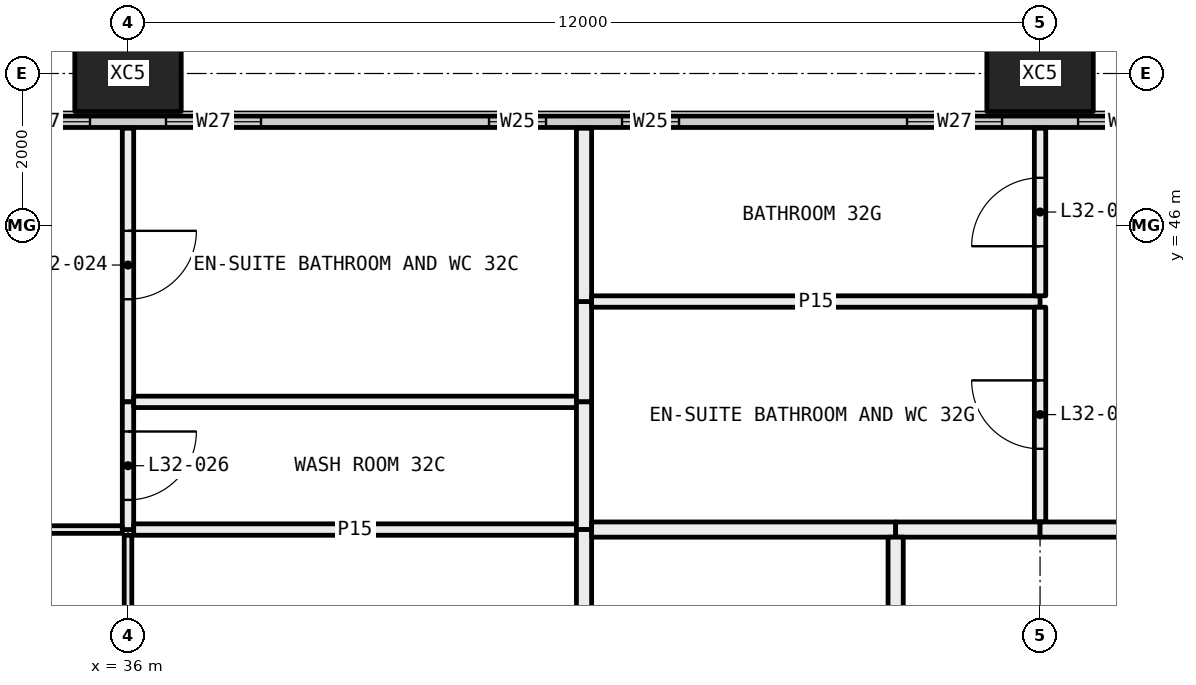
"""IFC4 building model, lengths in metres.
Left out: names, types, materials, properties, quantities, classifications, styles, units other than length and angle.
Written with IfcOpenShell. Run it as: python <this file> out.ifc"""

import sys

from ifc_helpers import new_model, si_unit, direction, frame, frame_2d, origin, origin_2d, place, context, subcontext, project, spatial, rectangle, hollow_rectangle, extrude, element, fill, save


model = new_model("IFC4")
c1 = context("Model", 3, precision=1e-05, world=origin(), true_north=direction((0.0, 1.0)))
c2 = subcontext(c1, "Body", "Model", "MODEL_VIEW")
j1 = project(units=[si_unit("LENGTHUNIT", "METRE"), si_unit("PLANEANGLEUNIT", "RADIAN")], contexts=[c1])
p1 = place(None, origin())
s1 = spatial("IfcSite", under=j1, at=p1, CompositionType="ELEMENT")
p2 = place(p1, origin())
s2 = spatial("IfcBuilding", under=s1, at=p2, CompositionType="ELEMENT")
p3 = place(p2, frame((0.0, 0.0, 124.2)))
s3 = spatial("IfcBuildingStorey", under=s2, at=p3, CompositionType="ELEMENT", Elevation=124.2)
for number, where, z_axis, x_axis in (
    (1, (36.0, 48.0, -0.4), (0.0, 0.0, 1.0), (1.0, 0.0, 0.0)),
    (2, (48.0, 48.0, -0.4), (0.0, 0.0, 1.0), (1.0, 0.0, 0.0)),
):
    element("IfcColumn", number, at=place(p3, frame(where, z_axis=z_axis, x_axis=x_axis)), inside=s3, PredefinedType="COLUMN", context=c2, shape_type="SweptSolid", body=[
        extrude(hollow_rectangle(XDim=1.4, YDim=1.0, WallThickness=0.055, at=origin_2d()), origin(), (0.0, 0.0, 1.0), 3.45),
    ])
p4 = place(p3, frame((6.56, 47.365, 0.0), z_axis=(0.0, 0.0, 1.0), x_axis=(1.0, 0.0, 0.0)))
e3 = element("IfcWall", 3, at=p4, inside=s3, PredefinedType="ELEMENTEDWALL", context=c2, shape_type="SweptSolid", body=[
    extrude(rectangle(XDim=58.88, YDim=0.15, at=frame_2d((29.44, 0.0))), origin(), (0.0, 0.0, 1.0), 3.05),
])
p5 = place(p4, frame((0.44, 0.0, 0.45)))
e4 = element("IfcOpeningElement", 4, at=p5, cuts=e3, PredefinedType="OPENING", context=c2, shape_type="SweptSolid", body=[
    extrude(rectangle(XDim=4.5, YDim=2.55, at=frame_2d((2.25, 1.275))), frame((0.0, 0.085, 0.0), z_axis=(0.0, -1.0, 0.0), x_axis=(1.0, 0.0, 0.0)), (0.0, 0.0, 1.0), 0.17),
])
p6 = place(p4, frame((5.94, 0.0, 0.45)))
e5 = element("IfcOpeningElement", 5, at=p6, cuts=e3, PredefinedType="OPENING", context=c2, shape_type="SweptSolid", body=[
    extrude(rectangle(XDim=1.25, YDim=2.55, at=frame_2d((0.625, 1.275))), frame((0.0, 0.085, 0.0), z_axis=(0.0, -1.0, 0.0), x_axis=(1.0, 0.0, 0.0)), (0.0, 0.0, 1.0), 0.17),
])
p7 = place(p4, frame((10.19, 0.0, 0.45)))
e6 = element("IfcOpeningElement", 6, at=p7, cuts=e3, PredefinedType="OPENING", context=c2, shape_type="SweptSolid", body=[
    extrude(rectangle(XDim=0.75, YDim=2.55, at=frame_2d((0.375, 1.275))), frame((0.0, 0.085, 0.0), z_axis=(0.0, -1.0, 0.0), x_axis=(1.0, 0.0, 0.0)), (0.0, 0.0, 1.0), 0.17),
])
p8 = place(p4, frame((11.94, 0.0, 0.45)))
e7 = element("IfcOpeningElement", 7, at=p8, cuts=e3, PredefinedType="OPENING", context=c2, shape_type="SweptSolid", body=[
    extrude(rectangle(XDim=0.75, YDim=2.55, at=frame_2d((0.375, 1.275))), frame((0.0, 0.085, 0.0), z_axis=(0.0, -1.0, 0.0), x_axis=(1.0, 0.0, 0.0)), (0.0, 0.0, 1.0), 0.17),
])
p9 = place(p4, frame((15.69, 0.0, 0.45)))
e8 = element("IfcOpeningElement", 8, at=p9, cuts=e3, PredefinedType="OPENING", context=c2, shape_type="SweptSolid", body=[
    extrude(rectangle(XDim=1.25, YDim=2.55, at=frame_2d((0.625, 1.275))), frame((0.0, 0.085, 0.0), z_axis=(0.0, -1.0, 0.0), x_axis=(1.0, 0.0, 0.0)), (0.0, 0.0, 1.0), 0.17),
])
p10 = place(p4, frame((17.94, 0.0, 0.45)))
e9 = element("IfcOpeningElement", 9, at=p10, cuts=e3, PredefinedType="OPENING", context=c2, shape_type="SweptSolid", body=[
    extrude(rectangle(XDim=1.25, YDim=2.55, at=frame_2d((0.625, 1.275))), frame((0.0, 0.085, 0.0), z_axis=(0.0, -1.0, 0.0), x_axis=(1.0, 0.0, 0.0)), (0.0, 0.0, 1.0), 0.17),
])
p11 = place(p4, frame((22.19, 0.0, 0.45)))
e10 = element("IfcOpeningElement", 10, at=p11, cuts=e3, PredefinedType="OPENING", context=c2, shape_type="SweptSolid", body=[
    extrude(rectangle(XDim=0.75, YDim=2.55, at=frame_2d((0.375, 1.275))), frame((0.0, 0.085, 0.0), z_axis=(0.0, -1.0, 0.0), x_axis=(1.0, 0.0, 0.0)), (0.0, 0.0, 1.0), 0.17),
])
p12 = place(p4, frame((23.94, 0.0, 0.45)))
e11 = element("IfcOpeningElement", 11, at=p12, cuts=e3, PredefinedType="OPENING", context=c2, shape_type="SweptSolid", body=[
    extrude(rectangle(XDim=0.75, YDim=2.55, at=frame_2d((0.375, 1.275))), frame((0.0, 0.085, 0.0), z_axis=(0.0, -1.0, 0.0), x_axis=(1.0, 0.0, 0.0)), (0.0, 0.0, 1.0), 0.17),
])
p13 = place(p4, frame((27.69, 0.0, 0.45)))
e12 = element("IfcOpeningElement", 12, at=p13, cuts=e3, PredefinedType="OPENING", context=c2, shape_type="SweptSolid", body=[
    extrude(rectangle(XDim=1.25, YDim=2.55, at=frame_2d((0.625, 1.275))), frame((0.0, 0.085, 0.0), z_axis=(0.0, -1.0, 0.0), x_axis=(1.0, 0.0, 0.0)), (0.0, 0.0, 1.0), 0.17),
])
p14 = place(p4, frame((29.94, 0.0, 0.45)))
e13 = element("IfcOpeningElement", 13, at=p14, cuts=e3, PredefinedType="OPENING", context=c2, shape_type="SweptSolid", body=[
    extrude(rectangle(XDim=1.25, YDim=2.55, at=frame_2d((0.625, 1.275))), frame((0.0, 0.085, 0.0), z_axis=(0.0, -1.0, 0.0), x_axis=(1.0, 0.0, 0.0)), (0.0, 0.0, 1.0), 0.17),
])
p15 = place(p4, frame((34.19, 0.0, 0.45)))
e14 = element("IfcOpeningElement", 14, at=p15, cuts=e3, PredefinedType="OPENING", context=c2, shape_type="SweptSolid", body=[
    extrude(rectangle(XDim=0.75, YDim=2.55, at=frame_2d((0.375, 1.275))), frame((0.0, 0.085, 0.0), z_axis=(0.0, -1.0, 0.0), x_axis=(1.0, 0.0, 0.0)), (0.0, 0.0, 1.0), 0.17),
])
p16 = place(p4, frame((35.94, 0.0, 0.45)))
e15 = element("IfcOpeningElement", 15, at=p16, cuts=e3, PredefinedType="OPENING", context=c2, shape_type="SweptSolid", body=[
    extrude(rectangle(XDim=0.75, YDim=2.55, at=frame_2d((0.375, 1.275))), frame((0.0, 0.085, 0.0), z_axis=(0.0, -1.0, 0.0), x_axis=(1.0, 0.0, 0.0)), (0.0, 0.0, 1.0), 0.17),
])
p17 = place(p4, frame((39.69, 0.0, 0.45)))
e16 = element("IfcOpeningElement", 16, at=p17, cuts=e3, PredefinedType="OPENING", context=c2, shape_type="SweptSolid", body=[
    extrude(rectangle(XDim=1.25, YDim=2.55, at=frame_2d((0.625, 1.275))), frame((0.0, 0.085, 0.0), z_axis=(0.0, -1.0, 0.0), x_axis=(1.0, 0.0, 0.0)), (0.0, 0.0, 1.0), 0.17),
])
p18 = place(p4, frame((41.94, 0.0, 0.45)))
e17 = element("IfcOpeningElement", 17, at=p18, cuts=e3, PredefinedType="OPENING", context=c2, shape_type="SweptSolid", body=[
    extrude(rectangle(XDim=1.25, YDim=2.55, at=frame_2d((0.625, 1.275))), frame((0.0, 0.085, 0.0), z_axis=(0.0, -1.0, 0.0), x_axis=(1.0, 0.0, 0.0)), (0.0, 0.0, 1.0), 0.17),
])
p19 = place(p4, frame((46.19, 0.0, 0.45)))
e18 = element("IfcOpeningElement", 18, at=p19, cuts=e3, PredefinedType="OPENING", context=c2, shape_type="SweptSolid", body=[
    extrude(rectangle(XDim=0.75, YDim=2.55, at=frame_2d((0.375, 1.275))), frame((0.0, 0.085, 0.0), z_axis=(0.0, -1.0, 0.0), x_axis=(1.0, 0.0, 0.0)), (0.0, 0.0, 1.0), 0.17),
])
p20 = place(p4, frame((47.94, 0.0, 0.45)))
e19 = element("IfcOpeningElement", 19, at=p20, cuts=e3, PredefinedType="OPENING", context=c2, shape_type="SweptSolid", body=[
    extrude(rectangle(XDim=0.75, YDim=2.55, at=frame_2d((0.375, 1.275))), frame((0.0, 0.085, 0.0), z_axis=(0.0, -1.0, 0.0), x_axis=(1.0, 0.0, 0.0)), (0.0, 0.0, 1.0), 0.17),
])
p21 = place(p4, frame((51.69, 0.0, 0.45)))
e20 = element("IfcOpeningElement", 20, at=p21, cuts=e3, PredefinedType="OPENING", context=c2, shape_type="SweptSolid", body=[
    extrude(rectangle(XDim=1.25, YDim=2.55, at=frame_2d((0.625, 1.275))), frame((0.0, 0.085, 0.0), z_axis=(0.0, -1.0, 0.0), x_axis=(1.0, 0.0, 0.0)), (0.0, 0.0, 1.0), 0.17),
])
p22 = place(p4, frame((53.94, 0.0, 0.45)))
e21 = element("IfcOpeningElement", 21, at=p22, cuts=e3, PredefinedType="OPENING", context=c2, shape_type="SweptSolid", body=[
    extrude(rectangle(XDim=4.5, YDim=2.55, at=frame_2d((2.25, 1.275))), frame((0.0, 0.085, 0.0), z_axis=(0.0, -1.0, 0.0), x_axis=(1.0, 0.0, 0.0)), (0.0, 0.0, 1.0), 0.17),
])
p23 = place(p3, frame((36.0, 43.68, 0.0), z_axis=(0.0, 0.0, 1.0), x_axis=(0.0, 1.0, 0.0)))
e22 = element("IfcWall", 22, at=p23, inside=s3, PredefinedType="PARTITIONING", context=c2, shape_type="SweptSolid", body=[
    extrude(rectangle(XDim=3.6, YDim=0.15, at=frame_2d((1.8, 0.0))), origin(), (0.0, 0.0, 1.0), 2.45),
])
p24 = place(p23, frame((1.35, 0.0, 0.0)))
e23 = element("IfcOpeningElement", 23, at=p24, cuts=e22, PredefinedType="OPENING", context=c2, shape_type="SweptSolid", body=[
    extrude(rectangle(XDim=0.9, YDim=2.1, at=frame_2d((0.45, 1.05))), frame((0.0, 0.085, 0.0), z_axis=(0.0, -1.0, 0.0), x_axis=(1.0, 0.0, 0.0)), (0.0, 0.0, 1.0), 0.17),
])
p25 = place(p3, frame((36.0, 42.0, 0.0), z_axis=(0.0, 0.0, 1.0), x_axis=(0.0, 1.0, 0.0)))
e24 = element("IfcWall", 24, at=p25, inside=s3, PredefinedType="PARTITIONING", context=c2, shape_type="SweptSolid", body=[
    extrude(rectangle(XDim=1.68, YDim=0.15, at=frame_2d((0.84, 0.0))), origin(), (0.0, 0.0, 1.0), 2.45),
])
p26 = place(p25, frame((0.39, 0.0, 0.0)))
e25 = element("IfcOpeningElement", 25, at=p26, cuts=e24, PredefinedType="OPENING", context=c2, shape_type="SweptSolid", body=[
    extrude(rectangle(XDim=0.9, YDim=2.1, at=frame_2d((0.45, 1.05))), frame((0.0, 0.085, 0.0), z_axis=(0.0, -1.0, 0.0), x_axis=(1.0, 0.0, 0.0)), (0.0, 0.0, 1.0), 0.17),
])
p27 = place(p3, frame((31.5, 42.0, 0.0), z_axis=(0.0, 0.0, 1.0), x_axis=(1.0, 0.0, 0.0)))
e26 = element("IfcWall", 26, at=p27, inside=s3, PredefinedType="PARTITIONING", context=c2, shape_type="SweptSolid", body=[
    extrude(rectangle(XDim=4.425, YDim=0.1, at=frame_2d((2.212, 0.0))), origin(), (0.0, 0.0, 1.0), 2.45),
])
p28 = place(p27, frame((1.762, 0.0, 0.0)))
e27 = element("IfcOpeningElement", 27, at=p28, cuts=e26, PredefinedType="OPENING", context=c2, shape_type="SweptSolid", body=[
    extrude(rectangle(XDim=0.9, YDim=2.1, at=frame_2d((0.45, 1.05))), frame((0.0, 0.06, 0.0), z_axis=(0.0, -1.0, 0.0), x_axis=(1.0, 0.0, 0.0)), (0.0, 0.0, 1.0), 0.12),
])
p29 = place(p3, frame((36.075, 43.68, 0.0), z_axis=(0.0, 0.0, 1.0), x_axis=(1.0, 0.0, 0.0)))
e28 = element("IfcWall", 28, at=p29, inside=s3, PredefinedType="PARTITIONING", context=c2, shape_type="SweptSolid", body=[
    extrude(rectangle(XDim=5.825, YDim=0.15, at=frame_2d((2.913, 0.0))), origin(), (0.0, 0.0, 1.0), 2.45),
])
p30 = place(p3, frame((42.0, 43.68, 0.0), z_axis=(0.0, 0.0, 1.0), x_axis=(0.0, 1.0, 0.0)))
e29 = element("IfcWall", 29, at=p30, inside=s3, PredefinedType="PARTITIONING", context=c2, shape_type="SweptSolid", body=[
    extrude(rectangle(XDim=1.32, YDim=0.2, at=frame_2d((0.66, 0.0))), origin(), (0.0, 0.0, 1.0), 3.05),
])
p31 = place(p3, frame((42.0, 45.0, 0.0), z_axis=(0.0, 0.0, 1.0), x_axis=(0.0, 1.0, 0.0)))
e30 = element("IfcWall", 30, at=p31, inside=s3, PredefinedType="PARTITIONING", context=c2, shape_type="SweptSolid", body=[
    extrude(rectangle(XDim=2.28, YDim=0.2, at=frame_2d((1.14, 0.0))), origin(), (0.0, 0.0, 1.0), 3.05),
])
p32 = place(p3, frame((36.075, 42.0, 0.0), z_axis=(0.0, 0.0, 1.0), x_axis=(1.0, 0.0, 0.0)))
e31 = element("IfcWall", 31, at=p32, inside=s3, PredefinedType="PARTITIONING", context=c2, shape_type="SweptSolid", body=[
    extrude(rectangle(XDim=5.825, YDim=0.15, at=frame_2d((2.913, 0.0))), origin(), (0.0, 0.0, 1.0), 2.45),
])
p33 = place(p3, frame((42.0, 42.0, 0.0), z_axis=(0.0, 0.0, 1.0), x_axis=(0.0, 1.0, 0.0)))
e32 = element("IfcWall", 32, at=p33, inside=s3, PredefinedType="PARTITIONING", context=c2, shape_type="SweptSolid", body=[
    extrude(rectangle(XDim=1.68, YDim=0.2, at=frame_2d((0.84, 0.0))), origin(), (0.0, 0.0, 1.0), 3.05),
])
p34 = place(p3, frame((36.0, 36.75, 0.0), z_axis=(0.0, 0.0, 1.0), x_axis=(0.0, 1.0, 0.0)))
e33 = element("IfcWall", 33, at=p34, inside=s3, PredefinedType="PARTITIONING", context=c2, shape_type="SweptSolid", body=[
    extrude(rectangle(XDim=5.175, YDim=0.1, at=frame_2d((2.587, 0.0))), origin(), (0.0, 0.0, 1.0), 2.45),
])
p35 = place(p34, frame((2.137, 0.0, 0.0)))
e34 = element("IfcOpeningElement", 34, at=p35, cuts=e33, PredefinedType="OPENING", context=c2, shape_type="SweptSolid", body=[
    extrude(rectangle(XDim=0.9, YDim=2.1, at=frame_2d((0.45, 1.05))), frame((0.0, 0.06, 0.0), z_axis=(0.0, -1.0, 0.0), x_axis=(1.0, 0.0, 0.0)), (0.0, 0.0, 1.0), 0.12),
])
p36 = place(p3, frame((42.0, 36.1, 0.0), z_axis=(0.0, 0.0, 1.0), x_axis=(0.0, 1.0, 0.0)))
e35 = element("IfcWall", 35, at=p36, inside=s3, PredefinedType="PARTITIONING", context=c2, shape_type="SweptSolid", body=[
    extrude(rectangle(XDim=5.9, YDim=0.2, at=frame_2d((2.95, 0.0))), origin(), (0.0, 0.0, 1.0), 3.05),
])
p37 = place(p3, frame((48.0, 45.0, 0.0), z_axis=(0.0, 0.0, 1.0), x_axis=(-1.0, 0.0, 0.0)))
e36 = element("IfcWall", 36, at=p37, inside=s3, PredefinedType="PARTITIONING", context=c2, shape_type="SweptSolid", body=[
    extrude(rectangle(XDim=5.9, YDim=0.15, at=frame_2d((2.95, 0.0))), origin(), (0.0, 0.0, 1.0), 3.05),
])
p38 = place(p3, frame((48.0, 42.1, 0.0), z_axis=(0.0, 0.0, 1.0), x_axis=(0.0, 1.0, 0.0)))
e37 = element("IfcWall", 37, at=p38, inside=s3, PredefinedType="PARTITIONING", context=c2, shape_type="SweptSolid", body=[
    extrude(rectangle(XDim=2.825, YDim=0.15, at=frame_2d((1.413, 0.0))), origin(), (0.0, 0.0, 1.0), 3.05),
])
p39 = place(p38, frame((0.962, 0.0, 0.0)))
e38 = element("IfcOpeningElement", 38, at=p39, cuts=e37, PredefinedType="OPENING", context=c2, shape_type="SweptSolid", body=[
    extrude(rectangle(XDim=0.9, YDim=2.1, at=frame_2d((0.45, 1.05))), frame((0.0, 0.085, 0.0), z_axis=(0.0, -1.0, 0.0), x_axis=(1.0, 0.0, 0.0)), (0.0, 0.0, 1.0), 0.17),
])
p40 = place(p3, frame((42.1, 42.0, 0.0), z_axis=(0.0, 0.0, 1.0), x_axis=(1.0, 0.0, 0.0)))
e39 = element("IfcWall", 39, at=p40, inside=s3, PredefinedType="PARTITIONING", context=c2, shape_type="SweptSolid", body=[
    extrude(rectangle(XDim=4.0, YDim=0.2, at=frame_2d((2.0, 0.0))), origin(), (0.0, 0.0, 1.0), 3.05),
])
p41 = place(p3, frame((46.1, 42.0, 0.0), z_axis=(0.0, 0.0, 1.0), x_axis=(1.0, 0.0, 0.0)))
e40 = element("IfcWall", 40, at=p41, inside=s3, PredefinedType="PARTITIONING", context=c2, shape_type="SweptSolid", body=[
    extrude(rectangle(XDim=1.9, YDim=0.2, at=frame_2d((0.95, 0.0))), origin(), (0.0, 0.0, 1.0), 3.05),
])
p42 = place(p3, frame((48.0, 45.075, 0.0), z_axis=(0.0, 0.0, 1.0), x_axis=(0.0, 1.0, 0.0)))
e41 = element("IfcWall", 41, at=p42, inside=s3, PredefinedType="PARTITIONING", context=c2, shape_type="SweptSolid", body=[
    extrude(rectangle(XDim=2.205, YDim=0.15, at=frame_2d((1.103, 0.0))), origin(), (0.0, 0.0, 1.0), 3.05),
])
p43 = place(p42, frame((0.653, 0.0, 0.0)))
e42 = element("IfcOpeningElement", 42, at=p43, cuts=e41, PredefinedType="OPENING", context=c2, shape_type="SweptSolid", body=[
    extrude(rectangle(XDim=0.9, YDim=2.1, at=frame_2d((0.45, 1.05))), frame((0.0, 0.085, 0.0), z_axis=(0.0, -1.0, 0.0), x_axis=(1.0, 0.0, 0.0)), (0.0, 0.0, 1.0), 0.17),
])
p44 = place(p3, frame((48.0, 42.0, 0.0), z_axis=(0.0, 0.0, 1.0), x_axis=(1.0, 0.0, 0.0)))
e43 = element("IfcWall", 43, at=p44, inside=s3, PredefinedType="PARTITIONING", context=c2, shape_type="SweptSolid", body=[
    extrude(rectangle(XDim=6.0, YDim=0.2, at=frame_2d((3.0, 0.0))), origin(), (0.0, 0.0, 1.0), 3.05),
])
p45 = place(p44, frame((2.5, 0.0, 0.0)))
e44 = element("IfcOpeningElement", 44, at=p45, cuts=e43, PredefinedType="OPENING", context=c2, shape_type="SweptSolid", body=[
    extrude(rectangle(XDim=1.0, YDim=2.1, at=frame_2d((0.5, 1.05))), frame((0.0, 0.11, 0.0), z_axis=(0.0, -1.0, 0.0), x_axis=(1.0, 0.0, 0.0)), (0.0, 0.0, 1.0), 0.22),
])
p46 = place(p3, frame((46.1, 36.1, 0.0), z_axis=(0.0, 0.0, 1.0), x_axis=(0.0, 1.0, 0.0)))
e45 = element("IfcWall", 45, at=p46, inside=s3, PredefinedType="PARTITIONING", context=c2, shape_type="SweptSolid", body=[
    extrude(rectangle(XDim=5.8, YDim=0.2, at=frame_2d((2.9, 0.0))), origin(), (0.0, 0.0, 1.0), 3.05),
])
p47 = place(p46, frame((2.45, 0.0, 0.0)))
e46 = element("IfcOpeningElement", 46, at=p47, cuts=e45, PredefinedType="OPENING", context=c2, shape_type="SweptSolid", body=[
    extrude(rectangle(XDim=0.9, YDim=2.1, at=frame_2d((0.45, 1.05))), frame((0.0, 0.11, 0.0), z_axis=(0.0, -1.0, 0.0), x_axis=(1.0, 0.0, 0.0)), (0.0, 0.0, 1.0), 0.22),
])
p48 = place(p13, origin())
e47 = element("IfcWindow", 47, at=p48, inside=s3, PartitioningType="SINGLE_PANEL", PredefinedType="WINDOW", context=c2, shape_type="SweptSolid", body=[
    extrude(rectangle(XDim=1.25, YDim=2.55, at=frame_2d((0.625, 1.275))), frame((0.0, 0.03, 0.0), z_axis=(0.0, -1.0, 0.0), x_axis=(1.0, 0.0, 0.0)), (0.0, 0.0, 1.0), 0.06),
])
fill(e12, e47)
p49 = place(p14, origin())
e48 = element("IfcWindow", 48, at=p49, inside=s3, PartitioningType="SINGLE_PANEL", PredefinedType="WINDOW", context=c2, shape_type="SweptSolid", body=[
    extrude(rectangle(XDim=1.25, YDim=2.55, at=frame_2d((0.625, 1.275))), frame((0.0, 0.03, 0.0), z_axis=(0.0, -1.0, 0.0), x_axis=(1.0, 0.0, 0.0)), (0.0, 0.0, 1.0), 0.06),
])
fill(e13, e48)
p50 = place(p15, origin())
e49 = element("IfcWindow", 49, at=p50, inside=s3, PartitioningType="SINGLE_PANEL", PredefinedType="WINDOW", context=c2, shape_type="SweptSolid", body=[
    extrude(rectangle(XDim=0.75, YDim=2.55, at=frame_2d((0.375, 1.275))), frame((0.0, 0.03, 0.0), z_axis=(0.0, -1.0, 0.0), x_axis=(1.0, 0.0, 0.0)), (0.0, 0.0, 1.0), 0.06),
])
fill(e14, e49)
p51 = place(p16, origin())
e50 = element("IfcWindow", 50, at=p51, inside=s3, PartitioningType="SINGLE_PANEL", PredefinedType="WINDOW", context=c2, shape_type="SweptSolid", body=[
    extrude(rectangle(XDim=0.75, YDim=2.55, at=frame_2d((0.375, 1.275))), frame((0.0, 0.03, 0.0), z_axis=(0.0, -1.0, 0.0), x_axis=(1.0, 0.0, 0.0)), (0.0, 0.0, 1.0), 0.06),
])
fill(e15, e50)
p52 = place(p17, origin())
e51 = element("IfcWindow", 51, at=p52, inside=s3, PartitioningType="SINGLE_PANEL", PredefinedType="WINDOW", context=c2, shape_type="SweptSolid", body=[
    extrude(rectangle(XDim=1.25, YDim=2.55, at=frame_2d((0.625, 1.275))), frame((0.0, 0.03, 0.0), z_axis=(0.0, -1.0, 0.0), x_axis=(1.0, 0.0, 0.0)), (0.0, 0.0, 1.0), 0.06),
])
fill(e16, e51)
p53 = place(p18, origin())
e52 = element("IfcWindow", 52, at=p53, inside=s3, PartitioningType="SINGLE_PANEL", PredefinedType="WINDOW", context=c2, shape_type="SweptSolid", body=[
    extrude(rectangle(XDim=1.25, YDim=2.55, at=frame_2d((0.625, 1.275))), frame((0.0, 0.03, 0.0), z_axis=(0.0, -1.0, 0.0), x_axis=(1.0, 0.0, 0.0)), (0.0, 0.0, 1.0), 0.06),
])
fill(e17, e52)
p54 = place(p24, frame((0.9, 0.0, 0.0), x_axis=(-1.0, 0.0, 0.0)))
e53 = element("IfcDoor", 53, at=p54, inside=s3, OperationType="SINGLE_SWING_RIGHT", PredefinedType="DOOR", context=c2, shape_type="SweptSolid", body=[
    extrude(rectangle(XDim=0.9, YDim=2.1, at=frame_2d((0.45, 1.05))), frame((0.0, 0.025, 0.0), z_axis=(0.0, -1.0, 0.0), x_axis=(1.0, 0.0, 0.0)), (0.0, 0.0, 1.0), 0.05),
])
fill(e23, e53)
p55 = place(p26, frame((0.9, 0.0, 0.0), x_axis=(-1.0, 0.0, 0.0)))
e54 = element("IfcDoor", 54, at=p55, inside=s3, OperationType="SINGLE_SWING_RIGHT", PredefinedType="DOOR", context=c2, shape_type="SweptSolid", body=[
    extrude(rectangle(XDim=0.9, YDim=2.1, at=frame_2d((0.45, 1.05))), frame((0.0, 0.025, 0.0), z_axis=(0.0, -1.0, 0.0), x_axis=(1.0, 0.0, 0.0)), (0.0, 0.0, 1.0), 0.05),
])
fill(e25, e54)
p56 = place(p39, origin())
e55 = element("IfcDoor", 55, at=p56, inside=s3, OperationType="SINGLE_SWING_LEFT", PredefinedType="DOOR", context=c2, shape_type="SweptSolid", body=[
    extrude(rectangle(XDim=0.9, YDim=2.1, at=frame_2d((0.45, 1.05))), frame((0.0, 0.025, 0.0), z_axis=(0.0, -1.0, 0.0), x_axis=(1.0, 0.0, 0.0)), (0.0, 0.0, 1.0), 0.05),
])
fill(e38, e55)
p57 = place(p43, origin())
e56 = element("IfcDoor", 56, at=p57, inside=s3, OperationType="SINGLE_SWING_RIGHT", PredefinedType="DOOR", context=c2, shape_type="SweptSolid", body=[
    extrude(rectangle(XDim=0.9, YDim=2.1, at=frame_2d((0.45, 1.05))), frame((0.0, 0.025, 0.0), z_axis=(0.0, -1.0, 0.0), x_axis=(1.0, 0.0, 0.0)), (0.0, 0.0, 1.0), 0.05),
])
fill(e42, e56)
save(model, sys.argv[1])
